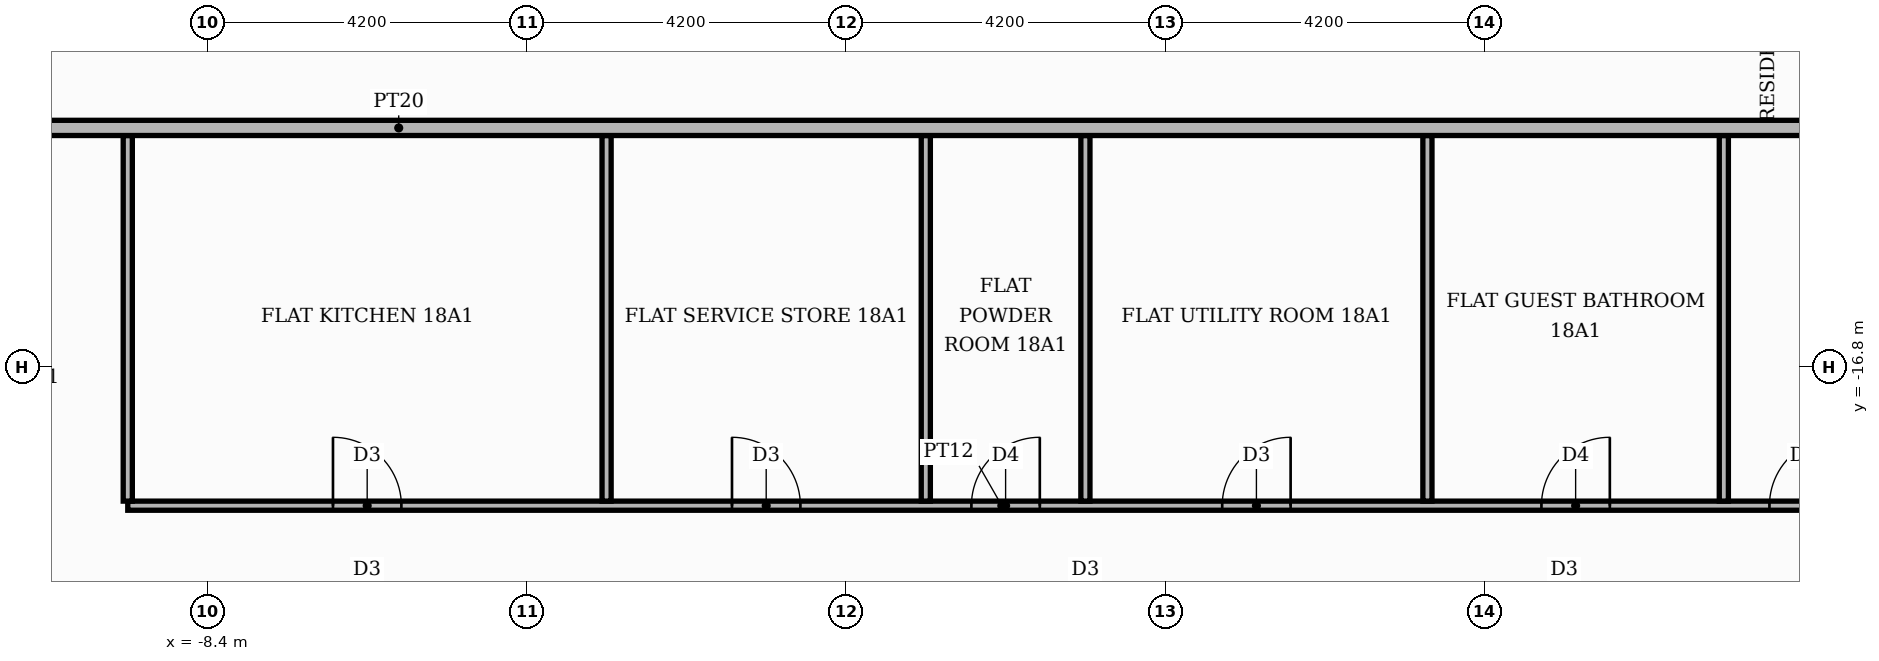
"""IFC4 building model, lengths in metres.
Left out: names, types, materials, properties, quantities, classifications, styles, units other than length and angle.
Written with IfcOpenShell. Run it as: python <this file> out.ifc"""

import sys

from ifc_helpers import new_model, si_unit, direction, frame, frame_2d, origin, place, context, subcontext, project, spatial, rectangle, extrude, element, fill, save


model = new_model("IFC4")
c1 = context("Model", 3, precision=1e-05, world=origin(), true_north=direction((0.0, 1.0)))
c2 = subcontext(c1, "Body", "Model", "MODEL_VIEW")
j1 = project(units=[si_unit("LENGTHUNIT", "METRE"), si_unit("PLANEANGLEUNIT", "RADIAN")], contexts=[c1])
p1 = place(None, origin())
s1 = spatial("IfcSite", under=j1, at=p1, CompositionType="ELEMENT")
p2 = place(p1, origin())
s2 = spatial("IfcBuilding", under=s1, at=p2, CompositionType="ELEMENT")
p3 = place(p2, frame((0.0, 0.0, 79.2)))
s3 = spatial("IfcBuildingStorey", under=s2, at=p3, CompositionType="ELEMENT", Elevation=79.2)
p4 = place(p3, frame((-9.45, -18.62, 0.0), z_axis=(0.0, 0.0, 1.0), x_axis=(1.0, 0.0, 0.0)))
e1 = element("IfcWall", 1, at=p4, inside=s3, PredefinedType="PARTITIONING", context=c2, shape_type="SweptSolid", body=[
    extrude(rectangle(XDim=23.0, YDim=0.12, at=frame_2d((11.5, 0.0))), origin(), (0.0, 0.0, 1.0), 3.48),
])
p5 = place(p4, frame((2.7, 0.0, 0.0)))
e2 = element("IfcOpeningElement", 2, at=p5, cuts=e1, PredefinedType="OPENING", context=c2, shape_type="SweptSolid", body=[
    extrude(rectangle(XDim=0.9, YDim=2.1, at=frame_2d((0.45, 1.05))), frame((0.0, 0.07, 0.0), z_axis=(0.0, -1.0, 0.0), x_axis=(1.0, 0.0, 0.0)), (0.0, 0.0, 1.0), 0.14),
])
p6 = place(p4, frame((7.95, 0.0, 0.0)))
e3 = element("IfcOpeningElement", 3, at=p6, cuts=e1, PredefinedType="OPENING", context=c2, shape_type="SweptSolid", body=[
    extrude(rectangle(XDim=0.9, YDim=2.1, at=frame_2d((0.45, 1.05))), frame((0.0, 0.07, 0.0), z_axis=(0.0, -1.0, 0.0), x_axis=(1.0, 0.0, 0.0)), (0.0, 0.0, 1.0), 0.14),
])
p7 = place(p4, frame((11.1, 0.0, 0.0)))
e4 = element("IfcOpeningElement", 4, at=p7, cuts=e1, PredefinedType="OPENING", context=c2, shape_type="SweptSolid", body=[
    extrude(rectangle(XDim=0.9, YDim=2.1, at=frame_2d((0.45, 1.05))), frame((0.0, 0.07, 0.0), z_axis=(0.0, -1.0, 0.0), x_axis=(1.0, 0.0, 0.0)), (0.0, 0.0, 1.0), 0.14),
])
p8 = place(p4, frame((14.4, 0.0, 0.0)))
e5 = element("IfcOpeningElement", 5, at=p8, cuts=e1, PredefinedType="OPENING", context=c2, shape_type="SweptSolid", body=[
    extrude(rectangle(XDim=0.9, YDim=2.1, at=frame_2d((0.45, 1.05))), frame((0.0, 0.07, 0.0), z_axis=(0.0, -1.0, 0.0), x_axis=(1.0, 0.0, 0.0)), (0.0, 0.0, 1.0), 0.14),
])
p9 = place(p4, frame((18.6, 0.0, 0.0)))
e6 = element("IfcOpeningElement", 6, at=p9, cuts=e1, PredefinedType="OPENING", context=c2, shape_type="SweptSolid", body=[
    extrude(rectangle(XDim=0.9, YDim=2.1, at=frame_2d((0.45, 1.05))), frame((0.0, 0.07, 0.0), z_axis=(0.0, -1.0, 0.0), x_axis=(1.0, 0.0, 0.0)), (0.0, 0.0, 1.0), 0.14),
])
p10 = place(p4, frame((21.6, 0.0, 0.0)))
e7 = element("IfcOpeningElement", 7, at=p10, cuts=e1, PredefinedType="OPENING", context=c2, shape_type="SweptSolid", body=[
    extrude(rectangle(XDim=0.9, YDim=2.1, at=frame_2d((0.45, 1.05))), frame((0.0, 0.07, 0.0), z_axis=(0.0, -1.0, 0.0), x_axis=(1.0, 0.0, 0.0)), (0.0, 0.0, 1.0), 0.14),
])
for number, where, z_axis, x_axis in (
    (8, (-9.45, -18.56, 0.0), (0.0, 0.0, 1.0), (0.0, 1.0, 0.0)),
    (9, (-3.15, -18.56, 0.0), (0.0, 0.0, 1.0), (0.0, 1.0, 0.0)),
    (10, (1.05, -18.56, 0.0), (0.0, 0.0, 1.0), (0.0, 1.0, 0.0)),
    (11, (3.15, -18.56, 0.0), (0.0, 0.0, 1.0), (0.0, 1.0, 0.0)),
    (12, (7.65, -18.56, 0.0), (0.0, 0.0, 1.0), (0.0, 1.0, 0.0)),
    (13, (11.55, -18.56, 0.0), (0.0, 0.0, 1.0), (0.0, 1.0, 0.0)),
):
    element("IfcWall", number, at=place(p3, frame(where, z_axis=z_axis, x_axis=x_axis)), inside=s3, PredefinedType="PARTITIONING", context=c2, shape_type="SweptSolid", body=[
        extrude(rectangle(XDim=4.81, YDim=0.12, at=frame_2d((2.405, 0.0))), origin(), (0.0, 0.0, 1.0), 3.48),
    ])
p11 = place(p3, frame((-25.42, -13.65, 0.0), z_axis=(0.0, 0.0, 1.0), x_axis=(1.0, 0.0, 0.0)))
e14 = element("IfcWall", 14, at=p11, inside=s3, PredefinedType="PARTITIONING", context=c2, shape_type="SweptSolid", body=[
    extrude(rectangle(XDim=39.07, YDim=0.2, at=frame_2d((19.535, 0.0))), origin(), (0.0, 0.0, 1.0), 3.48),
])
p12 = place(p11, frame((13.32, 0.0, 0.0)))
e15 = element("IfcOpeningElement", 15, at=p12, cuts=e14, PredefinedType="OPENING", context=c2, shape_type="SweptSolid", body=[
    extrude(rectangle(XDim=1.1, YDim=2.4, at=frame_2d((0.55, 1.2))), frame((0.0, 0.11, 0.0), z_axis=(0.0, -1.0, 0.0), x_axis=(1.0, 0.0, 0.0)), (0.0, 0.0, 1.0), 0.22),
])
p13 = place(p5, origin())
e16 = element("IfcDoor", 16, at=p13, inside=s3, OperationType="SINGLE_SWING_LEFT", PredefinedType="DOOR", context=c2, shape_type="SweptSolid", body=[
    extrude(rectangle(XDim=0.9, YDim=2.1, at=frame_2d((0.45, 1.05))), frame((0.0, 0.025, 0.0), z_axis=(0.0, -1.0, 0.0), x_axis=(1.0, 0.0, 0.0)), (0.0, 0.0, 1.0), 0.05),
])
fill(e2, e16)
p14 = place(p6, origin())
e17 = element("IfcDoor", 17, at=p14, inside=s3, OperationType="SINGLE_SWING_LEFT", PredefinedType="DOOR", context=c2, shape_type="SweptSolid", body=[
    extrude(rectangle(XDim=0.9, YDim=2.1, at=frame_2d((0.45, 1.05))), frame((0.0, 0.025, 0.0), z_axis=(0.0, -1.0, 0.0), x_axis=(1.0, 0.0, 0.0)), (0.0, 0.0, 1.0), 0.05),
])
fill(e3, e17)
p15 = place(p7, origin())
e18 = element("IfcDoor", 18, at=p15, inside=s3, OperationType="SINGLE_SWING_RIGHT", PredefinedType="DOOR", context=c2, shape_type="SweptSolid", body=[
    extrude(rectangle(XDim=0.9, YDim=2.1, at=frame_2d((0.45, 1.05))), frame((0.0, 0.025, 0.0), z_axis=(0.0, -1.0, 0.0), x_axis=(1.0, 0.0, 0.0)), (0.0, 0.0, 1.0), 0.05),
])
fill(e4, e18)
p16 = place(p8, origin())
e19 = element("IfcDoor", 19, at=p16, inside=s3, OperationType="SINGLE_SWING_RIGHT", PredefinedType="DOOR", context=c2, shape_type="SweptSolid", body=[
    extrude(rectangle(XDim=0.9, YDim=2.1, at=frame_2d((0.45, 1.05))), frame((0.0, 0.025, 0.0), z_axis=(0.0, -1.0, 0.0), x_axis=(1.0, 0.0, 0.0)), (0.0, 0.0, 1.0), 0.05),
])
fill(e5, e19)
p17 = place(p9, origin())
e20 = element("IfcDoor", 20, at=p17, inside=s3, OperationType="SINGLE_SWING_RIGHT", PredefinedType="DOOR", context=c2, shape_type="SweptSolid", body=[
    extrude(rectangle(XDim=0.9, YDim=2.1, at=frame_2d((0.45, 1.05))), frame((0.0, 0.025, 0.0), z_axis=(0.0, -1.0, 0.0), x_axis=(1.0, 0.0, 0.0)), (0.0, 0.0, 1.0), 0.05),
])
fill(e6, e20)
p18 = place(p10, origin())
e21 = element("IfcDoor", 21, at=p18, inside=s3, OperationType="SINGLE_SWING_RIGHT", PredefinedType="DOOR", context=c2, shape_type="SweptSolid", body=[
    extrude(rectangle(XDim=0.9, YDim=2.1, at=frame_2d((0.45, 1.05))), frame((0.0, 0.025, 0.0), z_axis=(0.0, -1.0, 0.0), x_axis=(1.0, 0.0, 0.0)), (0.0, 0.0, 1.0), 0.05),
])
fill(e7, e21)
save(model, sys.argv[1])
